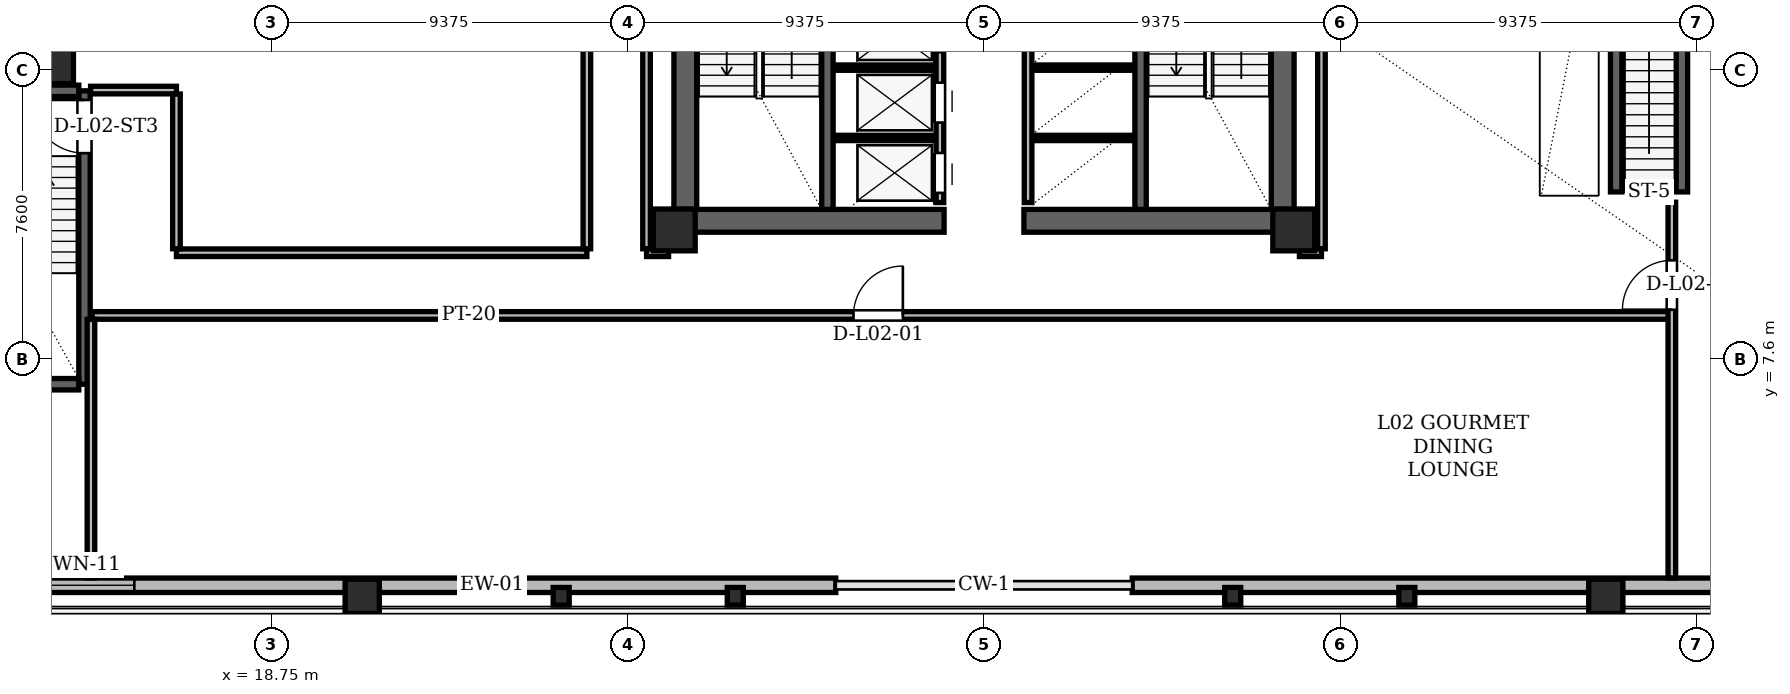
"""IFC4 building model, lengths in metres.
Left out: names, types, materials, properties, quantities, classifications, styles, units other than length and angle.
Written with IfcOpenShell. Run it as: python <this file> out.ifc"""

import sys

from ifc_helpers import new_model, si_unit, direction, frame, frame_2d, origin, origin_2d, place, context, subcontext, project, spatial, rectangle, hollow_rectangle, i_section, extrude, element, fill, save


model = new_model("IFC4")
c1 = context("Model", 3, precision=1e-05, world=origin(), true_north=direction((0.0, 1.0)))
c2 = subcontext(c1, "Body", "Model", "MODEL_VIEW")
j1 = project(units=[si_unit("LENGTHUNIT", "METRE"), si_unit("PLANEANGLEUNIT", "RADIAN")], contexts=[c1])
p1 = place(None, origin())
s1 = spatial("IfcSite", under=j1, at=p1, CompositionType="ELEMENT")
p2 = place(p1, origin())
s2 = spatial("IfcBuilding", under=s1, at=p2, CompositionType="ELEMENT")
p3 = place(p2, frame((0.0, 0.0, 9.9)))
s3 = spatial("IfcBuildingStorey", under=s2, at=p3, CompositionType="ELEMENT", Elevation=9.9)
for number, where, z_axis, x_axis in (
    (1, (29.35, 11.0, 0.0), (0.0, 0.0, 1.0), (1.0, 0.0, 0.0)),
    (2, (45.65, 11.0, 0.0), (0.0, 0.0, 1.0), (1.0, 0.0, 0.0)),
):
    element("IfcColumn", number, at=place(p3, frame(where, z_axis=z_axis, x_axis=x_axis)), inside=s3, PredefinedType="COLUMN", context=c2, shape_type="SweptSolid", body=[
        extrude(hollow_rectangle(XDim=1.1, YDim=1.1, WallThickness=0.09, at=origin_2d()), origin(), (0.0, 0.0, 1.0), 4.2),
    ])
for number, where, z_axis, x_axis in (
    (3, (13.09, 15.3, 0.005), (0.0, 0.0, 1.0), (1.0, 0.0, 0.0)),
    (4, (21.138, 1.36, 0.005), (0.0, 0.0, 1.0), (1.0, 0.0, 0.0)),
    (5, (53.862, 1.36, 0.005), (0.0, 0.0, 1.0), (1.0, 0.0, 0.0)),
):
    element("IfcColumn", number, at=place(p3, frame(where, z_axis=z_axis, x_axis=x_axis)), inside=s3, PredefinedType="COLUMN", context=c2, shape_type="SweptSolid", body=[
        extrude(hollow_rectangle(XDim=0.9, YDim=0.9, WallThickness=0.075, at=origin_2d()), origin(), (0.0, 0.0, 1.0), 4.191),
    ])
for number, where, z_axis, x_axis in (
    (6, (26.374, 1.36, 0.005), (0.0, 0.0, 1.0), (1.0, 0.0, 0.0)),
    (7, (30.955, 1.36, 0.005), (0.0, 0.0, 1.0), (1.0, 0.0, 0.0)),
    (8, (44.045, 1.36, 0.005), (0.0, 0.0, 1.0), (1.0, 0.0, 0.0)),
    (9, (48.626, 1.36, 0.005), (0.0, 0.0, 1.0), (1.0, 0.0, 0.0)),
):
    element("IfcColumn", number, at=place(p3, frame(where, z_axis=z_axis, x_axis=x_axis)), inside=s3, PredefinedType="COLUMN", context=c2, shape_type="SweptSolid", body=[
        extrude(i_section(OverallWidth=0.422, OverallDepth=0.465, WebThickness=0.045, FlangeThickness=0.072, at=origin_2d()), origin(), (0.0, 0.0, 1.0), 4.191),
    ])
for number, where, z_axis, x_axis in (
    (10, (29.64, 11.0, 0.0), (0.0, 0.0, 1.0), (0.0, 1.0, 0.0)),
    (11, (45.36, 11.0, 0.0), (0.0, 0.0, 1.0), (0.0, 1.0, 0.0)),
):
    element("IfcWall", number, at=place(p3, frame(where, z_axis=z_axis, x_axis=x_axis)), inside=s3, PredefinedType="SHEAR", context=c2, shape_type="SweptSolid", body=[
        extrude(rectangle(XDim=13.3, YDim=0.6, at=frame_2d((6.65, 0.0))), origin(), (0.0, 0.0, 1.0), 3.92),
    ])
for number, where, z_axis, x_axis in (
    (12, (29.35, 11.24, 0.0), (0.0, 0.0, 1.0), (1.0, 0.0, 0.0)),
    (13, (38.55, 11.24, 0.0), (0.0, 0.0, 1.0), (1.0, 0.0, 0.0)),
):
    element("IfcWall", number, at=place(p3, frame(where, z_axis=z_axis, x_axis=x_axis)), inside=s3, PredefinedType="SHEAR", context=c2, shape_type="SweptSolid", body=[
        extrude(rectangle(XDim=7.1, YDim=0.6, at=frame_2d((3.55, 0.0))), origin(), (0.0, 0.0, 1.0), 3.92),
    ])
for number, where, z_axis, x_axis in (
    (14, (33.38, 11.54, 0.0), (0.0, 0.0, 1.0), (0.0, 1.0, 0.0)),
    (15, (41.62, 11.54, 0.0), (0.0, 0.0, 1.0), (0.0, 1.0, 0.0)),
):
    element("IfcWall", number, at=place(p3, frame(where, z_axis=z_axis, x_axis=x_axis)), inside=s3, PredefinedType="SHEAR", context=c2, shape_type="SweptSolid", body=[
        extrude(rectangle(XDim=7.62, YDim=0.3, at=frame_2d((3.81, 0.0))), origin(), (0.0, 0.0, 1.0), 3.92),
    ])
p4 = place(p3, frame((13.83, 6.94, 0.0), z_axis=(0.0, 0.0, 1.0), x_axis=(0.0, 1.0, 0.0)))
e16 = element("IfcWall", 16, at=p4, inside=s3, PredefinedType="SHEAR", context=c2, shape_type="SweptSolid", body=[
    extrude(rectangle(XDim=7.72, YDim=0.3, at=frame_2d((3.86, 0.0))), origin(), (0.0, 0.0, 1.0), 3.92),
])
p5 = place(p4, frame((6.08, 0.0, 0.0)))
e17 = element("IfcOpeningElement", 17, at=p5, cuts=e16, PredefinedType="OPENING", context=c2, shape_type="SweptSolid", body=[
    extrude(rectangle(XDim=1.4, YDim=2.2, at=frame_2d((0.7, 1.1))), frame((0.0, 0.15, 0.0), z_axis=(0.0, -1.0, 0.0), x_axis=(1.0, 0.0, 0.0)), (0.0, 0.0, 1.0), 0.3),
])
for number, where, z_axis, x_axis in (
    (18, (10.39, 6.94, 0.0), (0.0, 0.0, 1.0), (1.0, 0.0, 0.0)),
    (19, (10.39, 14.66, 0.0), (0.0, 0.0, 1.0), (1.0, 0.0, 0.0)),
):
    element("IfcWall", number, at=place(p3, frame(where, z_axis=z_axis, x_axis=x_axis)), inside=s3, PredefinedType="SHEAR", context=c2, shape_type="SweptSolid", body=[
        extrude(rectangle(XDim=3.29, YDim=0.3, at=frame_2d((1.645, 0.0))), origin(), (0.0, 0.0, 1.0), 3.92),
    ])
for number, where, z_axis, x_axis in (
    (20, (54.135, 12.0, 0.0), (0.0, 0.0, 1.0), (0.0, 1.0, 0.0)),
    (21, (55.865, 12.0, 0.0), (0.0, 0.0, 1.0), (0.0, 1.0, 0.0)),
):
    element("IfcWall", number, at=place(p3, frame(where, z_axis=z_axis, x_axis=x_axis)), inside=s3, PredefinedType="SHEAR", context=c2, shape_type="SweptSolid", body=[
        extrude(rectangle(XDim=6.67, YDim=0.3, at=frame_2d((3.335, 0.0))), origin(), (0.0, 0.0, 1.0), 3.92),
    ])
p6 = place(p3, frame((6.228, 1.65, 0.0), z_axis=(0.0, 0.0, 1.0), x_axis=(1.0, 0.0, 0.0)))
e22 = element("IfcWall", 22, at=p6, inside=s3, PredefinedType="SOLIDWALL", context=c2, shape_type="SweptSolid", body=[
    extrude(rectangle(XDim=27.372, YDim=0.38, at=frame_2d((13.686, 0.0))), origin(), (0.0, 0.0, 1.0), 2.983),
])
p7 = place(p6, frame((6.414, 0.0, 0.85)))
e23 = element("IfcOpeningElement", 23, at=p7, cuts=e22, PredefinedType="OPENING", context=c2, shape_type="SweptSolid", body=[
    extrude(rectangle(XDim=2.5, YDim=1.963, at=frame_2d((1.25, 0.981))), frame((0.0, 0.19, 0.0), z_axis=(0.0, -1.0, 0.0), x_axis=(1.0, 0.0, 0.0)), (0.0, 0.0, 1.0), 0.38),
])
p8 = place(p3, frame((41.4, 1.65, 0.0), z_axis=(0.0, 0.0, 1.0), x_axis=(1.0, 0.0, 0.0)))
e24 = element("IfcWall", 24, at=p8, inside=s3, PredefinedType="SOLIDWALL", context=c2, shape_type="SweptSolid", body=[
    extrude(rectangle(XDim=27.372, YDim=0.38, at=frame_2d((13.686, 0.0))), origin(), (0.0, 0.0, 1.0), 2.983),
])
p9 = place(p8, frame((18.458, 0.0, 0.85)))
e25 = element("IfcOpeningElement", 25, at=p9, cuts=e24, PredefinedType="OPENING", context=c2, shape_type="SweptSolid", body=[
    extrude(rectangle(XDim=2.5, YDim=1.963, at=frame_2d((1.25, 0.981))), frame((0.0, 0.19, 0.0), z_axis=(0.0, -1.0, 0.0), x_axis=(1.0, 0.0, 0.0)), (0.0, 0.0, 1.0), 0.38),
])
p10 = place(p3, frame((36.34, 11.72, 0.0), z_axis=(0.0, 0.0, 1.0), x_axis=(0.0, 1.0, 0.0)))
e26 = element("IfcWall", 26, at=p10, inside=s3, PredefinedType="PARTITIONING", context=c2, shape_type="SweptSolid", body=[
    extrude(rectangle(XDim=7.6, YDim=0.2, at=frame_2d((3.8, 0.0))), origin(), (0.0, 0.0, 1.0), 3.92),
])
p11 = place(p10, frame((0.255, 0.0, 0.0)))
e27 = element("IfcOpeningElement", 27, at=p11, cuts=e26, PredefinedType="OPENING", context=c2, shape_type="SweptSolid", body=[
    extrude(rectangle(XDim=1.05, YDim=2.15, at=frame_2d((0.525, 1.075))), frame((0.0, 0.1, 0.0), z_axis=(0.0, -1.0, 0.0), x_axis=(1.0, 0.0, 0.0)), (0.0, 0.0, 1.0), 0.2),
])
p12 = place(p10, frame((2.105, 0.0, 0.0)))
e28 = element("IfcOpeningElement", 28, at=p12, cuts=e26, PredefinedType="OPENING", context=c2, shape_type="SweptSolid", body=[
    extrude(rectangle(XDim=1.05, YDim=2.15, at=frame_2d((0.525, 1.075))), frame((0.0, 0.1, 0.0), z_axis=(0.0, -1.0, 0.0), x_axis=(1.0, 0.0, 0.0)), (0.0, 0.0, 1.0), 0.2),
])
p13 = place(p10, frame((3.955, 0.0, 0.0)))
e29 = element("IfcOpeningElement", 29, at=p13, cuts=e26, PredefinedType="OPENING", context=c2, shape_type="SweptSolid", body=[
    extrude(rectangle(XDim=1.05, YDim=2.15, at=frame_2d((0.525, 1.075))), frame((0.0, 0.1, 0.0), z_axis=(0.0, -1.0, 0.0), x_axis=(1.0, 0.0, 0.0)), (0.0, 0.0, 1.0), 0.2),
])
for number, where, z_axis, x_axis in (
    (30, (33.56, 13.42, 0.0), (0.0, 0.0, 1.0), (1.0, 0.0, 0.0)),
    (31, (33.56, 15.27, 0.0), (0.0, 0.0, 1.0), (1.0, 0.0, 0.0)),
):
    element("IfcWall", number, at=place(p3, frame(where, z_axis=z_axis, x_axis=x_axis)), inside=s3, PredefinedType="PARTITIONING", context=c2, shape_type="SweptSolid", body=[
        extrude(rectangle(XDim=2.66, YDim=0.14, at=frame_2d((1.33, 0.0))), origin(), (0.0, 0.0, 1.0), 3.92),
    ])
p14 = place(p3, frame((38.66, 11.72, 0.0), z_axis=(0.0, 0.0, 1.0), x_axis=(0.0, 1.0, 0.0)))
e32 = element("IfcWall", 32, at=p14, inside=s3, PredefinedType="PARTITIONING", context=c2, shape_type="SweptSolid", body=[
    extrude(rectangle(XDim=9.1, YDim=0.2, at=frame_2d((4.55, 0.0))), origin(), (0.0, 0.0, 1.0), 3.92),
])
for number, where, z_axis, x_axis in (
    (33, (38.78, 13.42, 0.0), (0.0, 0.0, 1.0), (1.0, 0.0, 0.0)),
    (34, (38.78, 15.27, 0.0), (0.0, 0.0, 1.0), (1.0, 0.0, 0.0)),
):
    element("IfcWall", number, at=place(p3, frame(where, z_axis=z_axis, x_axis=x_axis)), inside=s3, PredefinedType="PARTITIONING", context=c2, shape_type="SweptSolid", body=[
        extrude(rectangle(XDim=2.66, YDim=0.14, at=frame_2d((1.33, 0.0))), origin(), (0.0, 0.0, 1.0), 3.92),
    ])
p15 = place(p3, frame((14.03, 8.75, 0.0), z_axis=(0.0, 0.0, 1.0), x_axis=(1.0, 0.0, 0.0)))
e35 = element("IfcWall", 35, at=p15, inside=s3, PredefinedType="PARTITIONING", context=c2, shape_type="SweptSolid", body=[
    extrude(rectangle(XDim=41.57, YDim=0.2, at=frame_2d((20.785, 0.0))), origin(), (0.0, 0.0, 1.0), 2.983),
])
p16 = place(p15, frame((20.035, 0.0, 0.0)))
e36 = element("IfcOpeningElement", 36, at=p16, cuts=e35, PredefinedType="OPENING", context=c2, shape_type="SweptSolid", body=[
    extrude(rectangle(XDim=1.3, YDim=2.2, at=frame_2d((0.65, 1.1))), frame((0.0, 0.1, 0.0), z_axis=(0.0, -1.0, 0.0), x_axis=(1.0, 0.0, 0.0)), (0.0, 0.0, 1.0), 0.2),
])
p17 = place(p3, frame((16.25, 10.4, 0.0), z_axis=(0.0, 0.0, 1.0), x_axis=(1.0, 0.0, 0.0)))
e37 = element("IfcWall", 37, at=p17, inside=s3, PredefinedType="PARTITIONING", context=c2, shape_type="SweptSolid", body=[
    extrude(rectangle(XDim=10.8, YDim=0.2, at=frame_2d((5.4, 0.0))), origin(), (0.0, 0.0, 1.0), 3.92),
])
for number, where, z_axis, x_axis in (
    (38, (28.62, 10.4, 0.0), (0.0, 0.0, 1.0), (1.0, 0.0, 0.0)),
    (39, (45.8, 10.4, 0.0), (0.0, 0.0, 1.0), (1.0, 0.0, 0.0)),
):
    element("IfcWall", number, at=place(p3, frame(where, z_axis=z_axis, x_axis=x_axis)), inside=s3, PredefinedType="PARTITIONING", context=c2, shape_type="SweptSolid", body=[
        extrude(rectangle(XDim=0.58, YDim=0.2, at=frame_2d((0.29, 0.0))), origin(), (0.0, 0.0, 1.0), 2.983),
    ])
p18 = place(p3, frame((13.99, 14.68, 0.0), z_axis=(0.0, 0.0, 1.0), x_axis=(1.0, 0.0, 0.0)))
e40 = element("IfcWall", 40, at=p18, inside=s3, PredefinedType="PARTITIONING", context=c2, shape_type="SweptSolid", body=[
    extrude(rectangle(XDim=2.26, YDim=0.2, at=frame_2d((1.13, 0.0))), origin(), (0.0, 0.0, 1.0), 2.983),
])
p19 = place(p3, frame((14.0, 1.844, 0.0), z_axis=(0.0, 0.0, 1.0), x_axis=(0.0, 1.0, 0.0)))
e41 = element("IfcWall", 41, at=p19, inside=s3, PredefinedType="PARTITIONING", context=c2, shape_type="SweptSolid", body=[
    extrude(rectangle(XDim=6.802, YDim=0.2, at=frame_2d((3.401, 0.0))), origin(), (0.0, 0.0, 1.0), 3.92),
])
p20 = place(p3, frame((16.25, 10.504, 0.0), z_axis=(0.0, 0.0, 1.0), x_axis=(0.0, 1.0, 0.0)))
e42 = element("IfcWall", 42, at=p20, inside=s3, PredefinedType="PARTITIONING", context=c2, shape_type="SweptSolid", body=[
    extrude(rectangle(XDim=4.072, YDim=0.2, at=frame_2d((2.036, 0.0))), origin(), (0.0, 0.0, 1.0), 2.983),
])
p21 = place(p3, frame((27.05, 10.504, 0.0), z_axis=(0.0, 0.0, 1.0), x_axis=(0.0, 1.0, 0.0)))
e43 = element("IfcWall", 43, at=p21, inside=s3, PredefinedType="PARTITIONING", context=c2, shape_type="SweptSolid", body=[
    extrude(rectangle(XDim=28.376, YDim=0.2, at=frame_2d((14.188, 0.0))), origin(), (0.0, 0.0, 1.0), 2.983),
])
p22 = place(p21, frame((5.975, 0.0, 0.0)))
e44 = element("IfcOpeningElement", 44, at=p22, cuts=e43, PredefinedType="OPENING", context=c2, shape_type="SweptSolid", body=[
    extrude(rectangle(XDim=1.3, YDim=2.2, at=frame_2d((0.65, 1.1))), frame((0.0, 0.1, 0.0), z_axis=(0.0, -1.0, 0.0), x_axis=(1.0, 0.0, 0.0)), (0.0, 0.0, 1.0), 0.2),
])
p23 = place(p3, frame((28.62, 10.504, 0.0), z_axis=(0.0, 0.0, 1.0), x_axis=(0.0, 1.0, 0.0)))
e45 = element("IfcWall", 45, at=p23, inside=s3, PredefinedType="PARTITIONING", context=c2, shape_type="SweptSolid", body=[
    extrude(rectangle(XDim=14.142, YDim=0.2, at=frame_2d((7.071, 0.0))), origin(), (0.0, 0.0, 1.0), 2.983),
])
p24 = place(p3, frame((46.38, 10.504, 0.0), z_axis=(0.0, 0.0, 1.0), x_axis=(0.0, 1.0, 0.0)))
e46 = element("IfcWall", 46, at=p24, inside=s3, PredefinedType="PARTITIONING", context=c2, shape_type="SweptSolid", body=[
    extrude(rectangle(XDim=14.142, YDim=0.2, at=frame_2d((7.071, 0.0))), origin(), (0.0, 0.0, 1.0), 3.92),
])
p25 = place(p3, frame((55.6, 1.844, 0.0), z_axis=(0.0, 0.0, 1.0), x_axis=(0.0, 1.0, 0.0)))
e47 = element("IfcWall", 47, at=p25, inside=s3, PredefinedType="PARTITIONING", context=c2, shape_type="SweptSolid", body=[
    extrude(rectangle(XDim=9.886, YDim=0.2, at=frame_2d((4.943, 0.0))), origin(), (0.0, 0.0, 1.0), 3.054),
])
p26 = place(p25, frame((7.056, 0.0, 0.0)))
e48 = element("IfcOpeningElement", 48, at=p26, cuts=e47, PredefinedType="OPENING", context=c2, shape_type="SweptSolid", body=[
    extrude(rectangle(XDim=1.3, YDim=2.2, at=frame_2d((0.65, 1.1))), frame((0.0, 0.1, 0.0), z_axis=(0.0, -1.0, 0.0), x_axis=(1.0, 0.0, 0.0)), (0.0, 0.0, 1.0), 0.2),
])
p27 = place(p7, origin())
e49 = element("IfcWindow", 49, at=p27, inside=s3, PartitioningType="SINGLE_PANEL", PredefinedType="WINDOW", context=c2, shape_type="SweptSolid", body=[
    extrude(rectangle(XDim=2.5, YDim=1.963, at=frame_2d((1.25, 0.981))), frame((0.0, 0.03, 0.0), z_axis=(0.0, -1.0, 0.0), x_axis=(1.0, 0.0, 0.0)), (0.0, 0.0, 1.0), 0.06),
])
fill(e23, e49)
p28 = place(p11, origin())
e50 = element("IfcDoor", 50, at=p28, inside=s3, OperationType="SLIDING_TO_LEFT", PredefinedType="DOOR", context=c2, shape_type="SweptSolid", body=[
    extrude(rectangle(XDim=1.05, YDim=2.15, at=frame_2d((0.525, 1.075))), frame((0.0, 0.025, 0.0), z_axis=(0.0, -1.0, 0.0), x_axis=(1.0, 0.0, 0.0)), (0.0, 0.0, 1.0), 0.05),
])
fill(e27, e50)
p29 = place(p12, origin())
e51 = element("IfcDoor", 51, at=p29, inside=s3, OperationType="SLIDING_TO_RIGHT", PredefinedType="DOOR", context=c2, shape_type="SweptSolid", body=[
    extrude(rectangle(XDim=1.05, YDim=2.15, at=frame_2d((0.525, 1.075))), frame((0.0, 0.025, 0.0), z_axis=(0.0, -1.0, 0.0), x_axis=(1.0, 0.0, 0.0)), (0.0, 0.0, 1.0), 0.05),
])
fill(e28, e51)
p30 = place(p13, origin())
e52 = element("IfcDoor", 52, at=p30, inside=s3, OperationType="SLIDING_TO_LEFT", PredefinedType="DOOR", context=c2, shape_type="SweptSolid", body=[
    extrude(rectangle(XDim=1.05, YDim=2.15, at=frame_2d((0.525, 1.075))), frame((0.0, 0.025, 0.0), z_axis=(0.0, -1.0, 0.0), x_axis=(1.0, 0.0, 0.0)), (0.0, 0.0, 1.0), 0.05),
])
fill(e29, e52)
p31 = place(p5, origin())
e53 = element("IfcDoor", 53, at=p31, inside=s3, OperationType="SINGLE_SWING_RIGHT", PredefinedType="DOOR", context=c2, shape_type="SweptSolid", body=[
    extrude(rectangle(XDim=1.4, YDim=2.2, at=frame_2d((0.7, 1.1))), frame((0.0, 0.025, 0.0), z_axis=(0.0, -1.0, 0.0), x_axis=(1.0, 0.0, 0.0)), (0.0, 0.0, 1.0), 0.05),
])
fill(e17, e53)
p32 = place(p16, origin())
e54 = element("IfcDoor", 54, at=p32, inside=s3, OperationType="SINGLE_SWING_RIGHT", PredefinedType="DOOR", context=c2, shape_type="SweptSolid", body=[
    extrude(rectangle(XDim=1.3, YDim=2.2, at=frame_2d((0.65, 1.1))), frame((0.0, 0.025, 0.0), z_axis=(0.0, -1.0, 0.0), x_axis=(1.0, 0.0, 0.0)), (0.0, 0.0, 1.0), 0.05),
])
fill(e36, e54)
p33 = place(p26, origin())
e55 = element("IfcDoor", 55, at=p33, inside=s3, OperationType="SINGLE_SWING_LEFT", PredefinedType="DOOR", context=c2, shape_type="SweptSolid", body=[
    extrude(rectangle(XDim=1.3, YDim=2.2, at=frame_2d((0.65, 1.1))), frame((0.0, 0.025, 0.0), z_axis=(0.0, -1.0, 0.0), x_axis=(1.0, 0.0, 0.0)), (0.0, 0.0, 1.0), 0.05),
])
fill(e48, e55)
save(model, sys.argv[1])
